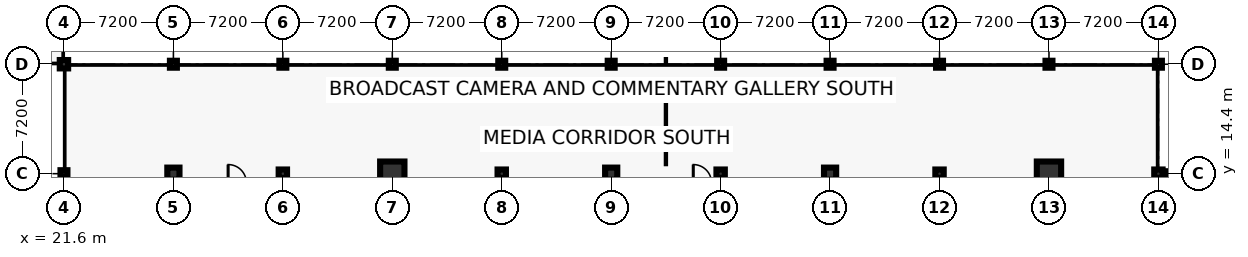
"""IFC4 building model, lengths in metres.
Left out: names, types, materials, properties, quantities, classifications, styles, units other than length and angle.
Written with IfcOpenShell. Run it as: python <this file> out.ifc"""

import sys

from ifc_helpers import new_model, si_unit, direction, frame, frame_2d, origin, origin_2d, place, context, subcontext, project, spatial, rectangle, circle, hollow_circle, extrude, element, save


model = new_model("IFC4")
c1 = context("Model", 3, precision=1e-05, world=origin(), true_north=direction((0.0, 1.0)))
c2 = subcontext(c1, "Body", "Model", "MODEL_VIEW")
j1 = project(units=[si_unit("LENGTHUNIT", "METRE"), si_unit("PLANEANGLEUNIT", "RADIAN")], contexts=[c1])
p1 = place(None, origin())
s1 = spatial("IfcSite", under=j1, at=p1, CompositionType="ELEMENT")
p2 = place(p1, origin())
s2 = spatial("IfcBuilding", under=s1, at=p2, CompositionType="ELEMENT")
p3 = place(p2, frame((0.0, 0.0, 18.6)))
s3 = spatial("IfcBuildingStorey", under=s2, at=p3, CompositionType="ELEMENT", Elevation=18.6)
p4 = place(p3, frame((21.6, 14.4, 0.0), z_axis=(0.0, 0.0, 1.0), x_axis=(1.0, 0.0, 0.0)))
e1 = element("IfcColumn", 1, at=p4, inside=s3, PredefinedType="COLUMN", context=c2, shape_type="SweptSolid", body=[
    extrude(hollow_circle(Radius=0.229, WallThickness=0.02, at=origin_2d()), origin(), (0.0, 0.0, 1.0), 4.4),
])
p5 = place(p3, frame((21.6, 21.6, 0.0), z_axis=(0.0, 0.0, 1.0), x_axis=(1.0, 0.0, 0.0)))
e2 = element("IfcColumn", 2, at=p5, inside=s3, PredefinedType="COLUMN", context=c2, shape_type="SweptSolid", body=[
    extrude(rectangle(XDim=0.55, YDim=0.55, at=origin_2d()), origin(), (0.0, 0.0, 1.0), 4.4),
])
p6 = place(p3, frame((28.8, 14.4, 0.0), z_axis=(0.0, 0.0, 1.0), x_axis=(1.0, 0.0, 0.0)))
e3 = element("IfcColumn", 3, at=p6, inside=s3, PredefinedType="COLUMN", context=c2, shape_type="SweptSolid", body=[
    extrude(circle(Radius=0.4, at=origin_2d()), origin(), (0.0, 0.0, 1.0), 4.4),
])
p7 = place(p3, frame((28.8, 21.6, 0.0), z_axis=(0.0, 0.0, 1.0), x_axis=(1.0, 0.0, 0.0)))
e4 = element("IfcColumn", 4, at=p7, inside=s3, PredefinedType="COLUMN", context=c2, shape_type="SweptSolid", body=[
    extrude(hollow_circle(Radius=0.229, WallThickness=0.02, at=origin_2d()), origin(), (0.0, 0.0, 1.0), 4.4),
])
p8 = place(p3, frame((36.0, 14.4, 0.0), z_axis=(0.0, 0.0, 1.0), x_axis=(1.0, 0.0, 0.0)))
e5 = element("IfcColumn", 5, at=p8, inside=s3, PredefinedType="COLUMN", context=c2, shape_type="SweptSolid", body=[
    extrude(rectangle(XDim=0.55, YDim=0.55, at=origin_2d()), origin(), (0.0, 0.0, 1.0), 4.4),
])
p9 = place(p3, frame((36.0, 21.6, 0.0), z_axis=(0.0, 0.0, 1.0), x_axis=(1.0, 0.0, 0.0)))
e6 = element("IfcColumn", 6, at=p9, inside=s3, PredefinedType="COLUMN", context=c2, shape_type="SweptSolid", body=[
    extrude(hollow_circle(Radius=0.229, WallThickness=0.02, at=origin_2d()), origin(), (0.0, 0.0, 1.0), 4.4),
])
p10 = place(p3, frame((43.2, 14.4, 0.0), z_axis=(0.0, 0.0, 1.0), x_axis=(1.0, 0.0, 0.0)))
e7 = element("IfcColumn", 7, at=p10, inside=s3, PredefinedType="COLUMN", context=c2, shape_type="SweptSolid", body=[
    extrude(circle(Radius=0.8, at=origin_2d()), origin(), (0.0, 0.0, 1.0), 4.4),
])
p11 = place(p3, frame((43.2, 21.6, 0.0), z_axis=(0.0, 0.0, 1.0), x_axis=(1.0, 0.0, 0.0)))
e8 = element("IfcColumn", 8, at=p11, inside=s3, PredefinedType="COLUMN", context=c2, shape_type="SweptSolid", body=[
    extrude(hollow_circle(Radius=0.229, WallThickness=0.02, at=origin_2d()), origin(), (0.0, 0.0, 1.0), 4.4),
])
p12 = place(p3, frame((50.4, 14.4, 0.0), z_axis=(0.0, 0.0, 1.0), x_axis=(1.0, 0.0, 0.0)))
e9 = element("IfcColumn", 9, at=p12, inside=s3, PredefinedType="COLUMN", context=c2, shape_type="SweptSolid", body=[
    extrude(rectangle(XDim=0.55, YDim=0.55, at=origin_2d()), origin(), (0.0, 0.0, 1.0), 4.4),
])
p13 = place(p3, frame((50.4, 21.6, 0.0), z_axis=(0.0, 0.0, 1.0), x_axis=(1.0, 0.0, 0.0)))
e10 = element("IfcColumn", 10, at=p13, inside=s3, PredefinedType="COLUMN", context=c2, shape_type="SweptSolid", body=[
    extrude(hollow_circle(Radius=0.229, WallThickness=0.02, at=origin_2d()), origin(), (0.0, 0.0, 1.0), 4.4),
])
p14 = place(p3, frame((57.6, 14.4, 0.0), z_axis=(0.0, 0.0, 1.0), x_axis=(1.0, 0.0, 0.0)))
e11 = element("IfcColumn", 11, at=p14, inside=s3, PredefinedType="COLUMN", context=c2, shape_type="SweptSolid", body=[
    extrude(circle(Radius=0.4, at=origin_2d()), origin(), (0.0, 0.0, 1.0), 4.4),
])
p15 = place(p3, frame((57.6, 21.6, 0.0), z_axis=(0.0, 0.0, 1.0), x_axis=(1.0, 0.0, 0.0)))
e12 = element("IfcColumn", 12, at=p15, inside=s3, PredefinedType="COLUMN", context=c2, shape_type="SweptSolid", body=[
    extrude(hollow_circle(Radius=0.229, WallThickness=0.02, at=origin_2d()), origin(), (0.0, 0.0, 1.0), 4.4),
])
p16 = place(p3, frame((64.8, 14.4, 0.0), z_axis=(0.0, 0.0, 1.0), x_axis=(1.0, 0.0, 0.0)))
e13 = element("IfcColumn", 13, at=p16, inside=s3, PredefinedType="COLUMN", context=c2, shape_type="SweptSolid", body=[
    extrude(rectangle(XDim=0.55, YDim=0.55, at=origin_2d()), origin(), (0.0, 0.0, 1.0), 4.4),
])
p17 = place(p3, frame((64.8, 21.6, 0.0), z_axis=(0.0, 0.0, 1.0), x_axis=(1.0, 0.0, 0.0)))
e14 = element("IfcColumn", 14, at=p17, inside=s3, PredefinedType="COLUMN", context=c2, shape_type="SweptSolid", body=[
    extrude(hollow_circle(Radius=0.229, WallThickness=0.02, at=origin_2d()), origin(), (0.0, 0.0, 1.0), 4.4),
])
p18 = place(p3, frame((72.0, 14.4, 0.0), z_axis=(0.0, 0.0, 1.0), x_axis=(1.0, 0.0, 0.0)))
e15 = element("IfcColumn", 15, at=p18, inside=s3, PredefinedType="COLUMN", context=c2, shape_type="SweptSolid", body=[
    extrude(circle(Radius=0.4, at=origin_2d()), origin(), (0.0, 0.0, 1.0), 4.4),
])
p19 = place(p3, frame((72.0, 21.6, 0.0), z_axis=(0.0, 0.0, 1.0), x_axis=(1.0, 0.0, 0.0)))
e16 = element("IfcColumn", 16, at=p19, inside=s3, PredefinedType="COLUMN", context=c2, shape_type="SweptSolid", body=[
    extrude(hollow_circle(Radius=0.229, WallThickness=0.02, at=origin_2d()), origin(), (0.0, 0.0, 1.0), 4.4),
])
p20 = place(p3, frame((79.2, 14.4, 0.0), z_axis=(0.0, 0.0, 1.0), x_axis=(1.0, 0.0, 0.0)))
e17 = element("IfcColumn", 17, at=p20, inside=s3, PredefinedType="COLUMN", context=c2, shape_type="SweptSolid", body=[
    extrude(rectangle(XDim=0.55, YDim=0.55, at=origin_2d()), origin(), (0.0, 0.0, 1.0), 4.4),
])
p21 = place(p3, frame((79.2, 21.6, 0.0), z_axis=(0.0, 0.0, 1.0), x_axis=(1.0, 0.0, 0.0)))
e18 = element("IfcColumn", 18, at=p21, inside=s3, PredefinedType="COLUMN", context=c2, shape_type="SweptSolid", body=[
    extrude(hollow_circle(Radius=0.229, WallThickness=0.02, at=origin_2d()), origin(), (0.0, 0.0, 1.0), 4.4),
])
p22 = place(p3, frame((86.4, 14.4, 0.0), z_axis=(0.0, 0.0, 1.0), x_axis=(1.0, 0.0, 0.0)))
e19 = element("IfcColumn", 19, at=p22, inside=s3, PredefinedType="COLUMN", context=c2, shape_type="SweptSolid", body=[
    extrude(circle(Radius=0.8, at=origin_2d()), origin(), (0.0, 0.0, 1.0), 4.4),
])
p23 = place(p3, frame((86.4, 21.6, 0.0), z_axis=(0.0, 0.0, 1.0), x_axis=(1.0, 0.0, 0.0)))
e20 = element("IfcColumn", 20, at=p23, inside=s3, PredefinedType="COLUMN", context=c2, shape_type="SweptSolid", body=[
    extrude(hollow_circle(Radius=0.229, WallThickness=0.02, at=origin_2d()), origin(), (0.0, 0.0, 1.0), 4.4),
])
p24 = place(p3, frame((93.6, 14.4, 0.0), z_axis=(0.0, 0.0, 1.0), x_axis=(1.0, 0.0, 0.0)))
e21 = element("IfcColumn", 21, at=p24, inside=s3, PredefinedType="COLUMN", context=c2, shape_type="SweptSolid", body=[
    extrude(rectangle(XDim=0.55, YDim=0.55, at=origin_2d()), origin(), (0.0, 0.0, 1.0), 4.4),
])
p25 = place(p3, frame((93.6, 21.6, 0.0), z_axis=(0.0, 0.0, 1.0), x_axis=(1.0, 0.0, 0.0)))
e22 = element("IfcColumn", 22, at=p25, inside=s3, PredefinedType="COLUMN", context=c2, shape_type="SweptSolid", body=[
    extrude(hollow_circle(Radius=0.229, WallThickness=0.02, at=origin_2d()), origin(), (0.0, 0.0, 1.0), 4.4),
])
p26 = place(p3, frame((93.95, 14.4, 0.0), z_axis=(0.0, 0.0, 1.0), x_axis=(1.0, 0.0, 0.0)))
e23 = element("IfcWall", 23, at=p26, inside=s3, PredefinedType="SOLIDWALL", context=c2, shape_type="SweptSolid", body=[
    extrude(rectangle(XDim=13.7, YDim=0.32, at=frame_2d((6.85, 0.0))), origin(), (0.0, 0.0, 1.0), 3.21),
])
save(model, sys.argv[1])
